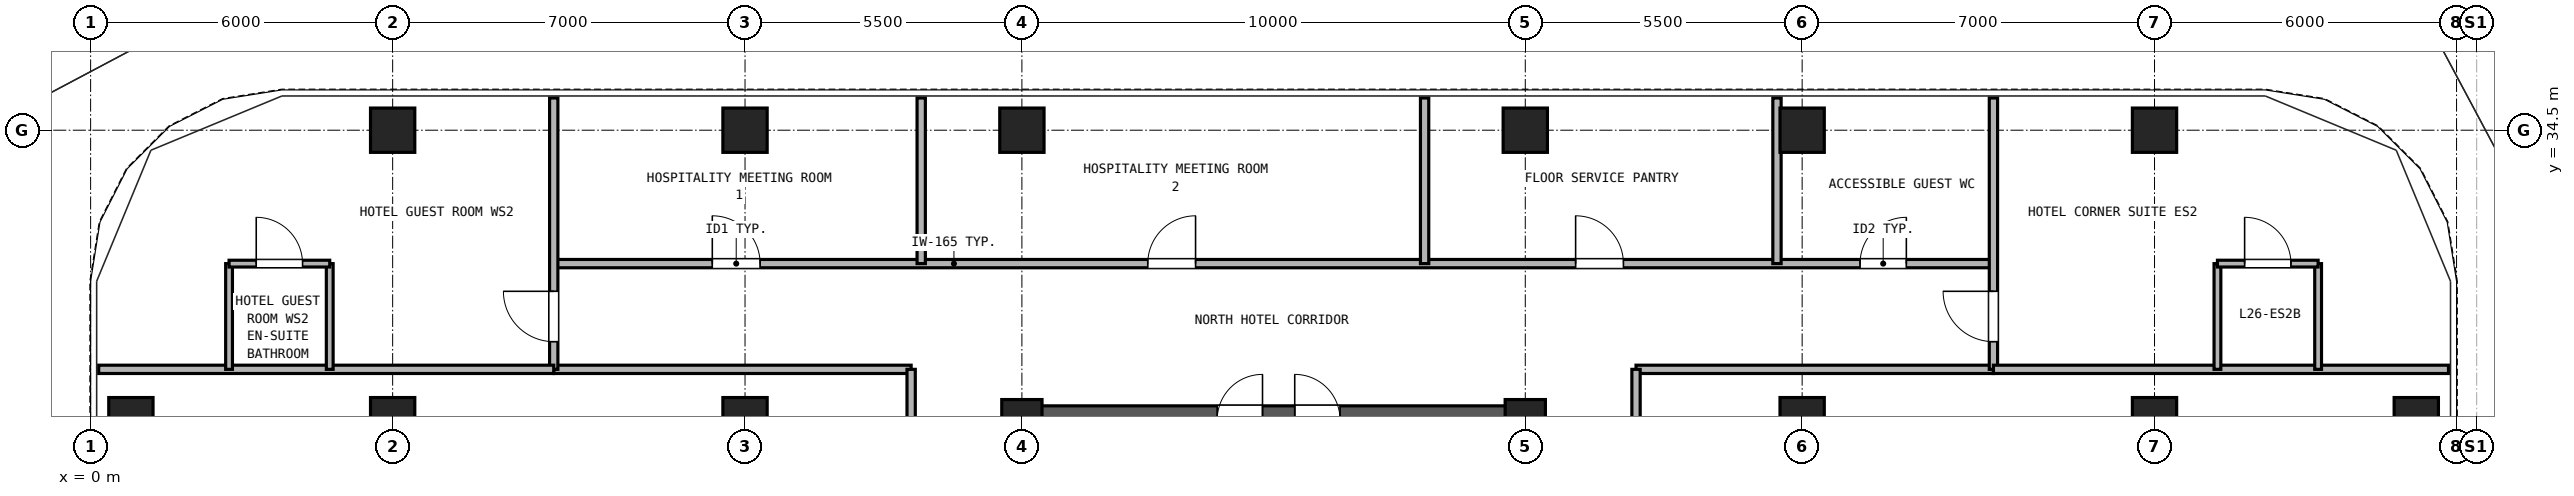
"""IFC4 building model, lengths in metres.
Left out: names, types, materials, properties, quantities, classifications, styles, units other than length and angle.
Written with IfcOpenShell. Run it as: python <this file> out.ifc"""

import sys

from ifc_helpers import new_model, si_unit, direction, frame, frame_2d, origin, origin_2d, place, context, subcontext, project, spatial, rectangle, hollow_rectangle, extrude, source, transform, mapped, element, fill, save


model = new_model("IFC4")
c1 = context("Model", 3, precision=1e-05, world=origin(), true_north=direction((0.0, 1.0)))
c2 = subcontext(c1, "Body", "Model", "MODEL_VIEW")
j1 = project(units=[si_unit("LENGTHUNIT", "METRE"), si_unit("PLANEANGLEUNIT", "RADIAN")], contexts=[c1])
p1 = place(None, origin())
s1 = spatial("IfcSite", under=j1, at=p1, CompositionType="ELEMENT")
p2 = place(p1, origin())
s2 = spatial("IfcBuilding", under=s1, at=p2, CompositionType="ELEMENT")
p3 = place(p2, frame((0.0, 0.0, 99.1)))
s3 = spatial("IfcBuildingStorey", under=s2, at=p3, CompositionType="ELEMENT", Elevation=99.1)
m1 = source(origin(), c2, "Body", "SweptSolid", [
    extrude(hollow_rectangle(XDim=0.88, YDim=0.88, WallThickness=0.05, at=origin_2d()), origin(), (0.0, 0.0, 1.0), 2.95),
])
for number, where, z_axis, x_axis in (
    (1, (6.0, 34.5, 0.0), (0.0, 0.0, 1.0), (1.0, 0.0, 0.0)),
    (2, (13.0, 34.5, 0.0), (0.0, 0.0, 1.0), (1.0, 0.0, 0.0)),
    (3, (18.5, 34.5, 0.0), (0.0, 0.0, 1.0), (1.0, 0.0, 0.0)),
    (4, (28.5, 34.5, 0.0), (0.0, 0.0, 1.0), (1.0, 0.0, 0.0)),
    (5, (34.0, 34.5, 0.0), (0.0, 0.0, 1.0), (1.0, 0.0, 0.0)),
    (6, (41.0, 34.5, 0.0), (0.0, 0.0, 1.0), (1.0, 0.0, 0.0)),
    (7, (0.8, 28.75, 0.0), (0.0, 0.0, 1.0), (1.0, 0.0, 0.0)),
    (8, (46.2, 28.75, 0.0), (0.0, 0.0, 1.0), (1.0, 0.0, 0.0)),
    (9, (6.0, 28.75, 0.0), (0.0, 0.0, 1.0), (1.0, 0.0, 0.0)),
    (10, (13.0, 28.75, 0.0), (0.0, 0.0, 1.0), (1.0, 0.0, 0.0)),
):
    element("IfcColumn", number, at=place(p3, frame(where, z_axis=z_axis, x_axis=x_axis)), inside=s3, PredefinedType="COLUMN", context=c2, shape_type="MappedRepresentation", body=[
        mapped(m1, transform((0.0, 0.0, 0.0), x_axis=(1.0, 0.0, 0.0), y_axis=(0.0, 1.0, 0.0), z_axis=(0.0, 0.0, 1.0), scale=1.0)),
    ])
m2 = source(origin(), c2, "Body", "SweptSolid", [
    extrude(hollow_rectangle(XDim=0.8, YDim=0.8, WallThickness=0.045, at=origin_2d()), origin(), (0.0, 0.0, 1.0), 2.95),
])
for number, where, z_axis, x_axis in (
    (11, (18.5, 28.75, 0.0), (0.0, 0.0, 1.0), (1.0, 0.0, 0.0)),
    (12, (28.5, 28.75, 0.0), (0.0, 0.0, 1.0), (1.0, 0.0, 0.0)),
):
    element("IfcColumn", number, at=place(p3, frame(where, z_axis=z_axis, x_axis=x_axis)), inside=s3, PredefinedType="COLUMN", context=c2, shape_type="MappedRepresentation", body=[
        mapped(m2, transform((0.0, 0.0, 0.0), x_axis=(1.0, 0.0, 0.0), y_axis=(0.0, 1.0, 0.0), z_axis=(0.0, 0.0, 1.0), scale=1.0)),
    ])
for number, where, z_axis, x_axis in (
    (13, (34.0, 28.75, 0.0), (0.0, 0.0, 1.0), (1.0, 0.0, 0.0)),
    (14, (41.0, 28.75, 0.0), (0.0, 0.0, 1.0), (1.0, 0.0, 0.0)),
):
    element("IfcColumn", number, at=place(p3, frame(where, z_axis=z_axis, x_axis=x_axis)), inside=s3, PredefinedType="COLUMN", context=c2, shape_type="MappedRepresentation", body=[
        mapped(m1, transform((0.0, 0.0, 0.0), x_axis=(1.0, 0.0, 0.0), y_axis=(0.0, 1.0, 0.0), z_axis=(0.0, 0.0, 1.0), scale=1.0)),
    ])
p4 = place(p3, frame((18.225, 28.75, 0.0), z_axis=(0.0, 0.0, 1.0), x_axis=(1.0, 0.0, 0.0)))
e15 = element("IfcWall", 15, at=p4, inside=s3, PredefinedType="SHEAR", context=c2, shape_type="SweptSolid", body=[
    extrude(rectangle(XDim=10.55, YDim=0.55, at=frame_2d((5.275, 0.0))), origin(), (0.0, 0.0, 1.0), 2.95),
])
p5 = place(p4, frame((4.155, 0.0, 0.0)))
e16 = element("IfcOpeningElement", 16, at=p5, cuts=e15, PredefinedType="OPENING", context=c2, shape_type="SweptSolid", body=[
    extrude(rectangle(XDim=0.9, YDim=2.05, at=frame_2d((0.45, 1.025))), frame((0.0, 0.285, 0.0), z_axis=(0.0, -1.0, 0.0), x_axis=(1.0, 0.0, 0.0)), (0.0, 0.0, 1.0), 0.57),
])
p6 = place(p4, frame((5.695, 0.0, 0.0)))
e17 = element("IfcOpeningElement", 17, at=p6, cuts=e15, PredefinedType="OPENING", context=c2, shape_type="SweptSolid", body=[
    extrude(rectangle(XDim=0.9, YDim=2.05, at=frame_2d((0.45, 1.025))), frame((0.0, 0.285, 0.0), z_axis=(0.0, -1.0, 0.0), x_axis=(1.0, 0.0, 0.0)), (0.0, 0.0, 1.0), 0.57),
])
p7 = place(p3, frame((9.2, 31.85, 0.0), z_axis=(0.0, 0.0, 1.0), x_axis=(1.0, 0.0, 0.0)))
e18 = element("IfcWall", 18, at=p7, inside=s3, PredefinedType="PARTITIONING", context=c2, shape_type="SweptSolid", body=[
    extrude(rectangle(XDim=28.6, YDim=0.165, at=frame_2d((14.3, 0.0))), origin(), (0.0, 0.0, 1.0), 2.583),
])
p8 = place(p7, frame((3.15, 0.0, 0.0)))
e19 = element("IfcOpeningElement", 19, at=p8, cuts=e18, PredefinedType="OPENING", context=c2, shape_type="SweptSolid", body=[
    extrude(rectangle(XDim=0.95, YDim=2.15, at=frame_2d((0.475, 1.075))), frame((0.0, 0.093, 0.0), z_axis=(0.0, -1.0, 0.0), x_axis=(1.0, 0.0, 0.0)), (0.0, 0.0, 1.0), 0.185),
])
p9 = place(p7, frame((11.8, 0.0, 0.0)))
e20 = element("IfcOpeningElement", 20, at=p9, cuts=e18, PredefinedType="OPENING", context=c2, shape_type="SweptSolid", body=[
    extrude(rectangle(XDim=0.95, YDim=2.15, at=frame_2d((0.475, 1.075))), frame((0.0, 0.093, 0.0), z_axis=(0.0, -1.0, 0.0), x_axis=(1.0, 0.0, 0.0)), (0.0, 0.0, 1.0), 0.185),
])
p10 = place(p7, frame((20.3, 0.0, 0.0)))
e21 = element("IfcOpeningElement", 21, at=p10, cuts=e18, PredefinedType="OPENING", context=c2, shape_type="SweptSolid", body=[
    extrude(rectangle(XDim=0.95, YDim=2.15, at=frame_2d((0.475, 1.075))), frame((0.0, 0.093, 0.0), z_axis=(0.0, -1.0, 0.0), x_axis=(1.0, 0.0, 0.0)), (0.0, 0.0, 1.0), 0.185),
])
p11 = place(p7, frame((25.95, 0.0, 0.0)))
e22 = element("IfcOpeningElement", 22, at=p11, cuts=e18, PredefinedType="OPENING", context=c2, shape_type="SweptSolid", body=[
    extrude(rectangle(XDim=0.92, YDim=2.1, at=frame_2d((0.46, 1.05))), frame((0.0, 0.093, 0.0), z_axis=(0.0, -1.0, 0.0), x_axis=(1.0, 0.0, 0.0)), (0.0, 0.0, 1.0), 0.185),
])
for number, where, z_axis, x_axis in (
    (23, (9.2, 29.75, 0.0), (0.0, 0.0, 1.0), (1.0, 0.0, 0.0)),
    (24, (30.7, 29.75, 0.0), (0.0, 0.0, 1.0), (1.0, 0.0, 0.0)),
):
    element("IfcWall", number, at=place(p3, frame(where, z_axis=z_axis, x_axis=x_axis)), inside=s3, PredefinedType="PARTITIONING", context=c2, shape_type="SweptSolid", body=[
        extrude(rectangle(XDim=7.1, YDim=0.165, at=frame_2d((3.55, 0.0))), origin(), (0.0, 0.0, 1.0), 2.95),
    ])
p12 = place(p3, frame((16.3, 11.15, 0.0), z_axis=(0.0, 0.0, 1.0), x_axis=(0.0, 1.0, 0.0)))
e25 = element("IfcWall", 25, at=p12, inside=s3, PredefinedType="PARTITIONING", context=c2, shape_type="SweptSolid", body=[
    extrude(rectangle(XDim=18.6, YDim=0.165, at=frame_2d((9.3, 0.0))), origin(), (0.0, 0.0, 1.0), 2.95),
])
p13 = place(p12, frame((8.8, 0.0, 0.0)))
e26 = element("IfcOpeningElement", 26, at=p13, cuts=e25, PredefinedType="OPENING", context=c2, shape_type="SweptSolid", body=[
    extrude(rectangle(XDim=0.95, YDim=2.15, at=frame_2d((0.475, 1.075))), frame((0.0, 0.093, 0.0), z_axis=(0.0, -1.0, 0.0), x_axis=(1.0, 0.0, 0.0)), (0.0, 0.0, 1.0), 0.185),
])
p14 = place(p3, frame((30.7, 11.15, 0.0), z_axis=(0.0, 0.0, 1.0), x_axis=(0.0, 1.0, 0.0)))
e27 = element("IfcWall", 27, at=p14, inside=s3, PredefinedType="PARTITIONING", context=c2, shape_type="SweptSolid", body=[
    extrude(rectangle(XDim=18.6, YDim=0.165, at=frame_2d((9.3, 0.0))), origin(), (0.0, 0.0, 1.0), 2.95),
])
p15 = place(p14, frame((4.15, 0.0, 0.0)))
e28 = element("IfcOpeningElement", 28, at=p15, cuts=e27, PredefinedType="OPENING", context=c2, shape_type="SweptSolid", body=[
    extrude(rectangle(XDim=0.95, YDim=2.15, at=frame_2d((0.475, 1.075))), frame((0.0, 0.093, 0.0), z_axis=(0.0, -1.0, 0.0), x_axis=(1.0, 0.0, 0.0)), (0.0, 0.0, 1.0), 0.185),
])
p16 = place(p14, frame((13.45, 0.0, 0.0)))
e29 = element("IfcOpeningElement", 29, at=p16, cuts=e27, PredefinedType="OPENING", context=c2, shape_type="SweptSolid", body=[
    extrude(rectangle(XDim=0.95, YDim=2.15, at=frame_2d((0.475, 1.075))), frame((0.0, 0.093, 0.0), z_axis=(0.0, -1.0, 0.0), x_axis=(1.0, 0.0, 0.0)), (0.0, 0.0, 1.0), 0.185),
])
p17 = place(p3, frame((9.2, 29.75, 0.0), z_axis=(0.0, 0.0, 1.0), x_axis=(0.0, 1.0, 0.0)))
e30 = element("IfcWall", 30, at=p17, inside=s3, PredefinedType="PARTITIONING", context=c2, shape_type="SweptSolid", body=[
    extrude(rectangle(XDim=5.39, YDim=0.165, at=frame_2d((2.695, 0.0))), origin(), (0.0, 0.0, 1.0), 2.95),
])
p18 = place(p17, frame((0.55, 0.0, 0.0)))
e31 = element("IfcOpeningElement", 31, at=p18, cuts=e30, PredefinedType="OPENING", context=c2, shape_type="SweptSolid", body=[
    extrude(rectangle(XDim=1.0, YDim=2.15, at=frame_2d((0.5, 1.075))), frame((0.0, 0.093, 0.0), z_axis=(0.0, -1.0, 0.0), x_axis=(1.0, 0.0, 0.0)), (0.0, 0.0, 1.0), 0.185),
])
p19 = place(p3, frame((37.8, 29.75, 0.0), z_axis=(0.0, 0.0, 1.0), x_axis=(0.0, 1.0, 0.0)))
e32 = element("IfcWall", 32, at=p19, inside=s3, PredefinedType="PARTITIONING", context=c2, shape_type="SweptSolid", body=[
    extrude(rectangle(XDim=5.39, YDim=0.165, at=frame_2d((2.695, 0.0))), origin(), (0.0, 0.0, 1.0), 2.95),
])
p20 = place(p19, frame((0.55, 0.0, 0.0)))
e33 = element("IfcOpeningElement", 33, at=p20, cuts=e32, PredefinedType="OPENING", context=c2, shape_type="SweptSolid", body=[
    extrude(rectangle(XDim=1.0, YDim=2.15, at=frame_2d((0.5, 1.075))), frame((0.0, 0.093, 0.0), z_axis=(0.0, -1.0, 0.0), x_axis=(1.0, 0.0, 0.0)), (0.0, 0.0, 1.0), 0.185),
])
for number, where, z_axis, x_axis in (
    (34, (0.16, 29.75, 0.0), (0.0, 0.0, 1.0), (1.0, 0.0, 0.0)),
    (35, (37.8, 29.75, 0.0), (0.0, 0.0, 1.0), (1.0, 0.0, 0.0)),
):
    element("IfcWall", number, at=place(p3, frame(where, z_axis=z_axis, x_axis=x_axis)), inside=s3, PredefinedType="PARTITIONING", context=c2, shape_type="SweptSolid", body=[
        extrude(rectangle(XDim=9.04, YDim=0.165, at=frame_2d((4.52, 0.0))), origin(), (0.0, 0.0, 1.0), 2.95),
    ])
for number, where, z_axis, x_axis in (
    (36, (2.75, 29.75, 0.0), (0.0, 0.0, 1.0), (0.0, 1.0, 0.0)),
    (37, (4.75, 29.75, 0.0), (0.0, 0.0, 1.0), (0.0, 1.0, 0.0)),
):
    element("IfcWall", number, at=place(p3, frame(where, z_axis=z_axis, x_axis=x_axis)), inside=s3, PredefinedType="PARTITIONING", context=c2, shape_type="SweptSolid", body=[
        extrude(rectangle(XDim=2.1, YDim=0.135, at=frame_2d((1.05, 0.0))), origin(), (0.0, 0.0, 1.0), 2.95),
    ])
p21 = place(p3, frame((2.75, 31.85, 0.0), z_axis=(0.0, 0.0, 1.0), x_axis=(1.0, 0.0, 0.0)))
e38 = element("IfcWall", 38, at=p21, inside=s3, PredefinedType="PARTITIONING", context=c2, shape_type="SweptSolid", body=[
    extrude(rectangle(XDim=2.0, YDim=0.135, at=frame_2d((1.0, 0.0))), origin(), (0.0, 0.0, 1.0), 2.95),
])
p22 = place(p21, frame((0.54, 0.0, 0.0)))
e39 = element("IfcOpeningElement", 39, at=p22, cuts=e38, PredefinedType="OPENING", context=c2, shape_type="SweptSolid", body=[
    extrude(rectangle(XDim=0.92, YDim=2.1, at=frame_2d((0.46, 1.05))), frame((0.0, 0.077, 0.0), z_axis=(0.0, -1.0, 0.0), x_axis=(1.0, 0.0, 0.0)), (0.0, 0.0, 1.0), 0.155),
])
for number, where, z_axis, x_axis in (
    (40, (42.25, 29.75, 0.0), (0.0, 0.0, 1.0), (0.0, 1.0, 0.0)),
    (41, (44.25, 29.75, 0.0), (0.0, 0.0, 1.0), (0.0, 1.0, 0.0)),
):
    element("IfcWall", number, at=place(p3, frame(where, z_axis=z_axis, x_axis=x_axis)), inside=s3, PredefinedType="PARTITIONING", context=c2, shape_type="SweptSolid", body=[
        extrude(rectangle(XDim=2.1, YDim=0.135, at=frame_2d((1.05, 0.0))), origin(), (0.0, 0.0, 1.0), 2.95),
    ])
p23 = place(p3, frame((42.25, 31.85, 0.0), z_axis=(0.0, 0.0, 1.0), x_axis=(1.0, 0.0, 0.0)))
e42 = element("IfcWall", 42, at=p23, inside=s3, PredefinedType="PARTITIONING", context=c2, shape_type="SweptSolid", body=[
    extrude(rectangle(XDim=2.0, YDim=0.135, at=frame_2d((1.0, 0.0))), origin(), (0.0, 0.0, 1.0), 2.95),
])
p24 = place(p23, frame((0.54, 0.0, 0.0)))
e43 = element("IfcOpeningElement", 43, at=p24, cuts=e42, PredefinedType="OPENING", context=c2, shape_type="SweptSolid", body=[
    extrude(rectangle(XDim=0.92, YDim=2.1, at=frame_2d((0.46, 1.05))), frame((0.0, 0.077, 0.0), z_axis=(0.0, -1.0, 0.0), x_axis=(1.0, 0.0, 0.0)), (0.0, 0.0, 1.0), 0.155),
])
for number, where, z_axis, x_axis in (
    (44, (16.5, 31.85, 0.0), (0.0, 0.0, 1.0), (0.0, 1.0, 0.0)),
    (45, (26.5, 31.85, 0.0), (0.0, 0.0, 1.0), (0.0, 1.0, 0.0)),
    (46, (33.5, 31.85, 0.0), (0.0, 0.0, 1.0), (0.0, 1.0, 0.0)),
):
    element("IfcWall", number, at=place(p3, frame(where, z_axis=z_axis, x_axis=x_axis)), inside=s3, PredefinedType="PARTITIONING", context=c2, shape_type="SweptSolid", body=[
        extrude(rectangle(XDim=3.29, YDim=0.165, at=frame_2d((1.645, 0.0))), origin(), (0.0, 0.0, 1.0), 2.95),
    ])
p25 = place(p22, frame((0.92, 0.0, 0.0), z_axis=(0.0, 0.0, 1.0), x_axis=(-1.0, 0.0, 0.0)))
e47 = element("IfcDoor", 47, at=p25, inside=s3, OperationType="SINGLE_SWING_LEFT", PredefinedType="DOOR", context=c2, shape_type="SweptSolid", body=[
    extrude(rectangle(XDim=0.92, YDim=2.1, at=frame_2d((0.46, 1.05))), frame((0.0, 0.025, 0.0), z_axis=(0.0, -1.0, 0.0), x_axis=(1.0, 0.0, 0.0)), (0.0, 0.0, 1.0), 0.05),
])
fill(e39, e47)
p26 = place(p18, origin())
e48 = element("IfcDoor", 48, at=p26, inside=s3, OperationType="SINGLE_SWING_RIGHT", PredefinedType="DOOR", context=c2, shape_type="SweptSolid", body=[
    extrude(rectangle(XDim=1.0, YDim=2.15, at=frame_2d((0.5, 1.075))), frame((0.0, 0.025, 0.0), z_axis=(0.0, -1.0, 0.0), x_axis=(1.0, 0.0, 0.0)), (0.0, 0.0, 1.0), 0.05),
])
fill(e31, e48)
p27 = place(p24, frame((0.92, 0.0, 0.0), z_axis=(0.0, 0.0, 1.0), x_axis=(-1.0, 0.0, 0.0)))
e49 = element("IfcDoor", 49, at=p27, inside=s3, OperationType="SINGLE_SWING_LEFT", PredefinedType="DOOR", context=c2, shape_type="SweptSolid", body=[
    extrude(rectangle(XDim=0.92, YDim=2.1, at=frame_2d((0.46, 1.05))), frame((0.0, 0.025, 0.0), z_axis=(0.0, -1.0, 0.0), x_axis=(1.0, 0.0, 0.0)), (0.0, 0.0, 1.0), 0.05),
])
fill(e43, e49)
p28 = place(p20, frame((1.0, 0.0, 0.0), z_axis=(0.0, 0.0, 1.0), x_axis=(-1.0, 0.0, 0.0)))
e50 = element("IfcDoor", 50, at=p28, inside=s3, OperationType="SINGLE_SWING_RIGHT", PredefinedType="DOOR", context=c2, shape_type="SweptSolid", body=[
    extrude(rectangle(XDim=1.0, YDim=2.15, at=frame_2d((0.5, 1.075))), frame((0.0, 0.025, 0.0), z_axis=(0.0, -1.0, 0.0), x_axis=(1.0, 0.0, 0.0)), (0.0, 0.0, 1.0), 0.05),
])
fill(e33, e50)
p29 = place(p8, origin())
e51 = element("IfcDoor", 51, at=p29, inside=s3, OperationType="SINGLE_SWING_LEFT", PredefinedType="DOOR", context=c2, shape_type="SweptSolid", body=[
    extrude(rectangle(XDim=0.95, YDim=2.15, at=frame_2d((0.475, 1.075))), frame((0.0, 0.025, 0.0), z_axis=(0.0, -1.0, 0.0), x_axis=(1.0, 0.0, 0.0)), (0.0, 0.0, 1.0), 0.05),
])
fill(e19, e51)
p30 = place(p9, origin())
e52 = element("IfcDoor", 52, at=p30, inside=s3, OperationType="SINGLE_SWING_RIGHT", PredefinedType="DOOR", context=c2, shape_type="SweptSolid", body=[
    extrude(rectangle(XDim=0.95, YDim=2.15, at=frame_2d((0.475, 1.075))), frame((0.0, 0.025, 0.0), z_axis=(0.0, -1.0, 0.0), x_axis=(1.0, 0.0, 0.0)), (0.0, 0.0, 1.0), 0.05),
])
fill(e20, e52)
p31 = place(p10, origin())
e53 = element("IfcDoor", 53, at=p31, inside=s3, OperationType="SINGLE_SWING_LEFT", PredefinedType="DOOR", context=c2, shape_type="SweptSolid", body=[
    extrude(rectangle(XDim=0.95, YDim=2.15, at=frame_2d((0.475, 1.075))), frame((0.0, 0.025, 0.0), z_axis=(0.0, -1.0, 0.0), x_axis=(1.0, 0.0, 0.0)), (0.0, 0.0, 1.0), 0.05),
])
fill(e21, e53)
p32 = place(p11, origin())
e54 = element("IfcDoor", 54, at=p32, inside=s3, OperationType="SINGLE_SWING_RIGHT", PredefinedType="DOOR", context=c2, shape_type="SweptSolid", body=[
    extrude(rectangle(XDim=0.92, YDim=2.1, at=frame_2d((0.46, 1.05))), frame((0.0, 0.025, 0.0), z_axis=(0.0, -1.0, 0.0), x_axis=(1.0, 0.0, 0.0)), (0.0, 0.0, 1.0), 0.05),
])
fill(e22, e54)
save(model, sys.argv[1])
